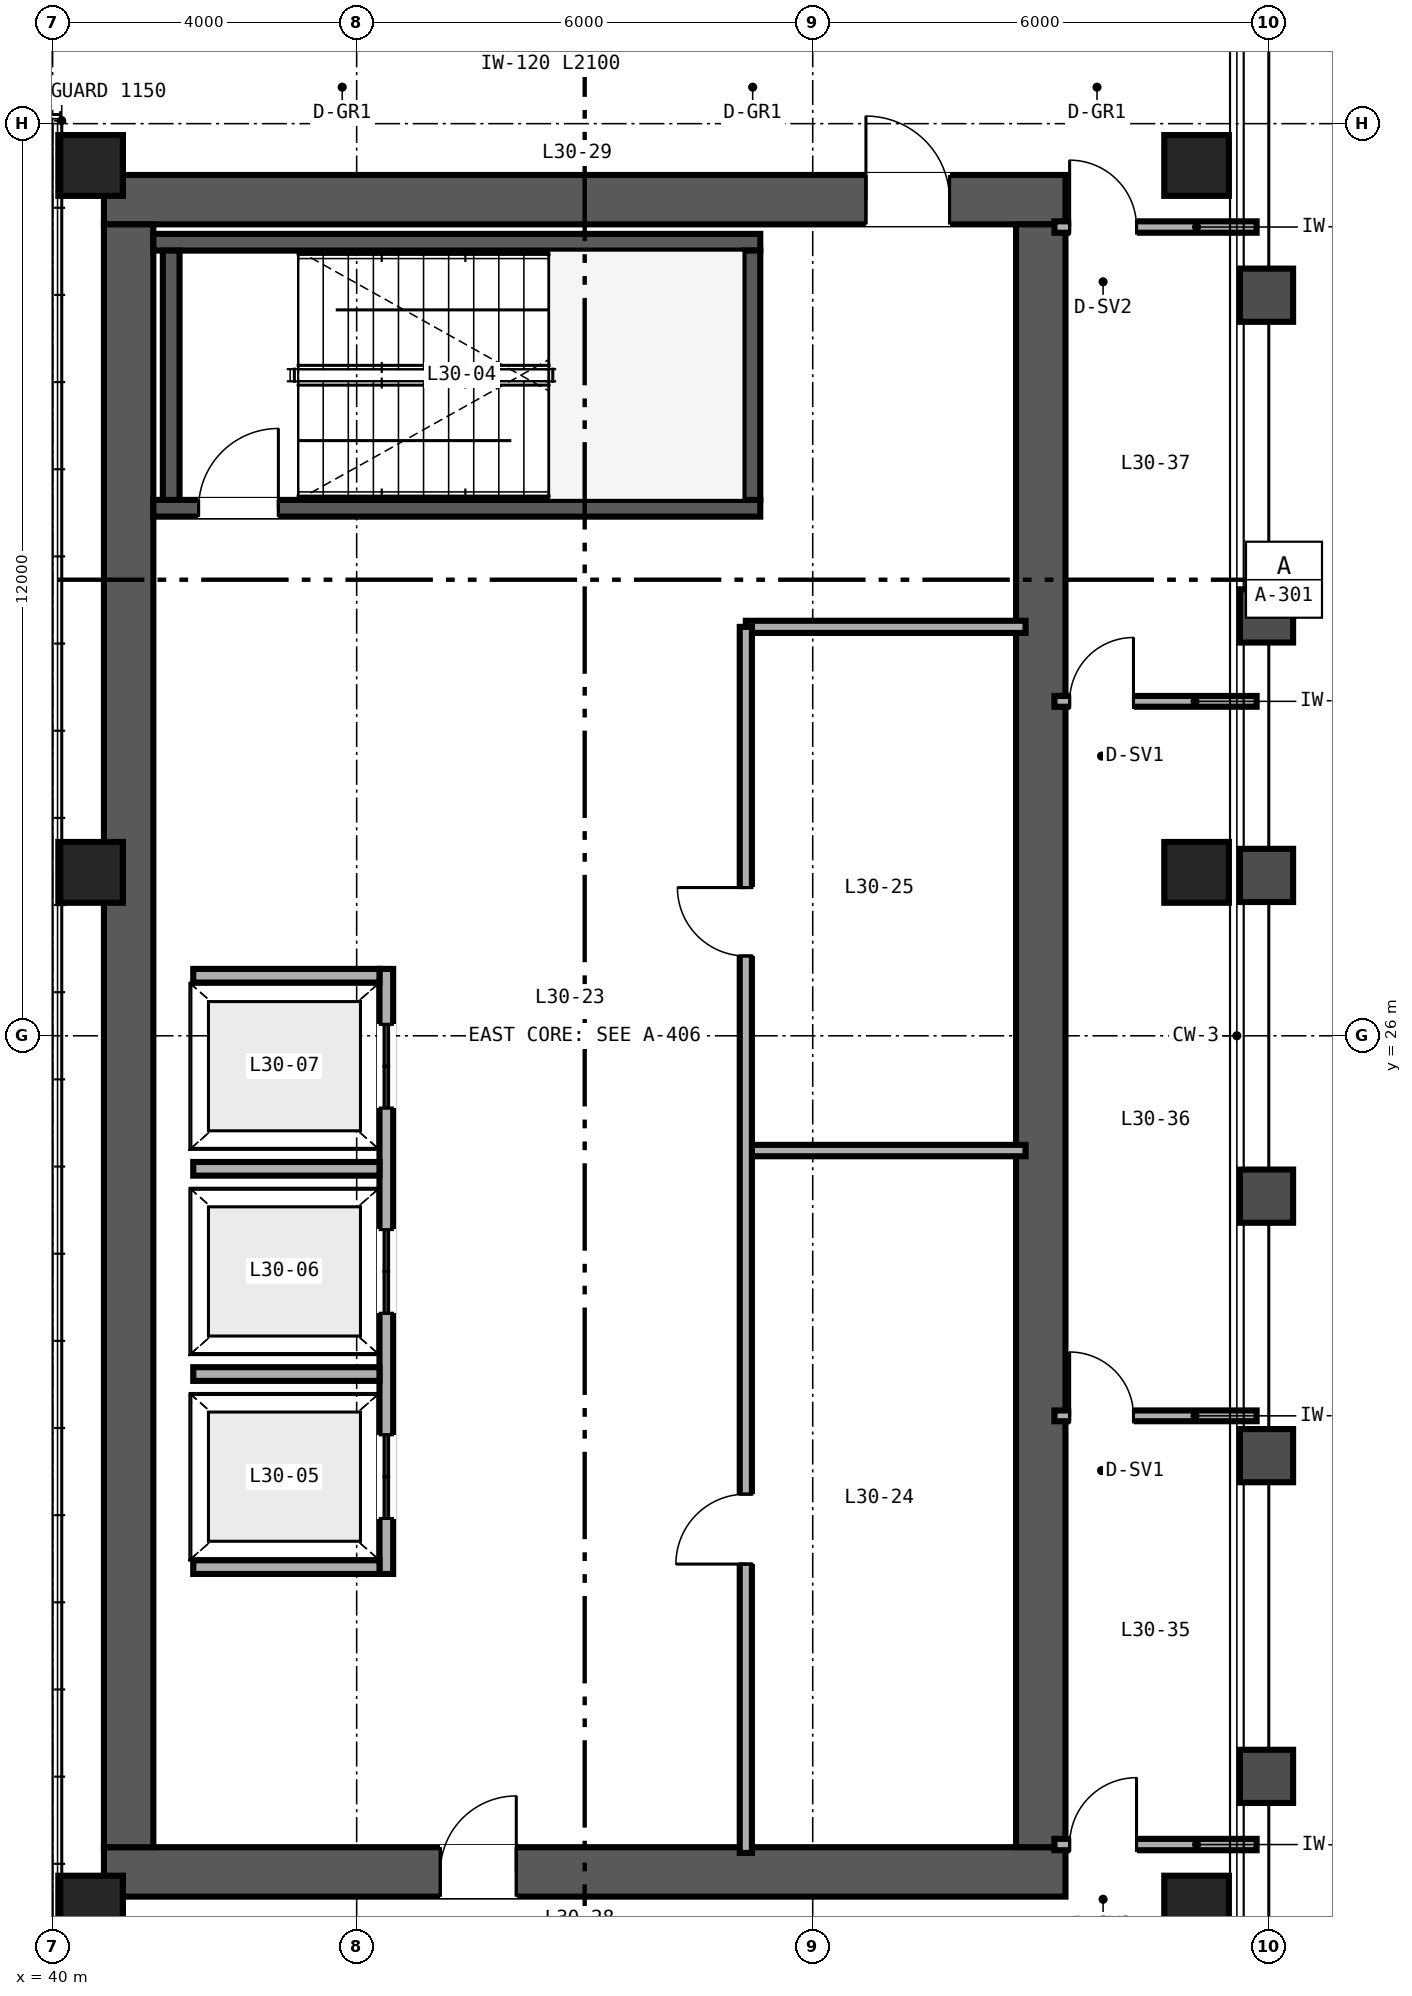
"""IFC4 building model, lengths in metres.
Left out: names, types, materials, properties, quantities, classifications, styles, units other than length and angle.
Written with IfcOpenShell. Run it as: python <this file> out.ifc"""

import sys

from ifc_helpers import new_model, si_unit, direction, frame, frame_2d, origin, origin_2d, place, context, subcontext, project, spatial, rectangle, hollow_rectangle, extrude, source, transform, mapped, element, fill, save


model = new_model("IFC4")
c1 = context("Model", 3, precision=1e-05, world=origin(), true_north=direction((0.0, 1.0)))
c2 = subcontext(c1, "Body", "Model", "MODEL_VIEW")
j1 = project(units=[si_unit("LENGTHUNIT", "METRE"), si_unit("PLANEANGLEUNIT", "RADIAN")], contexts=[c1])
p1 = place(None, origin())
s1 = spatial("IfcSite", under=j1, at=p1, CompositionType="ELEMENT")
p2 = place(p1, origin())
s2 = spatial("IfcBuilding", under=s1, at=p2, CompositionType="ELEMENT")
p3 = place(p2, frame((0.0, 0.0, 122.4)))
s3 = spatial("IfcBuildingStorey", under=s2, at=p3, CompositionType="ELEMENT", Elevation=122.4)
p4 = place(p3, frame((40.675, 15.0, 0.0), z_axis=(0.0, 0.0, 1.0), x_axis=(1.0, 0.0, 0.0)))
e1 = element("IfcWall", 1, at=p4, inside=s3, PredefinedType="SHEAR", context=c2, shape_type="SweptSolid", body=[
    extrude(rectangle(XDim=12.65, YDim=0.65, at=frame_2d((6.325, 0.0))), origin(), (0.0, 0.0, 1.0), 3.36),
])
p5 = place(p4, frame((4.425, 0.0, 0.0)))
e2 = element("IfcOpeningElement", 2, at=p5, cuts=e1, PredefinedType="OPENING", context=c2, shape_type="SweptSolid", body=[
    extrude(rectangle(XDim=1.0, YDim=2.15, at=frame_2d((0.5, 1.075))), frame((0.0, 0.335, 0.0), z_axis=(0.0, -1.0, 0.0), x_axis=(1.0, 0.0, 0.0)), (0.0, 0.0, 1.0), 0.67),
])
p6 = place(p3, frame((40.675, 37.0, 0.0), z_axis=(0.0, 0.0, 1.0), x_axis=(1.0, 0.0, 0.0)))
e3 = element("IfcWall", 3, at=p6, inside=s3, PredefinedType="SHEAR", context=c2, shape_type="SweptSolid", body=[
    extrude(rectangle(XDim=12.65, YDim=0.65, at=frame_2d((6.325, 0.0))), origin(), (0.0, 0.0, 1.0), 3.36),
])
p7 = place(p6, frame((10.025, 0.0, 0.0)))
e4 = element("IfcOpeningElement", 4, at=p7, cuts=e3, PredefinedType="OPENING", context=c2, shape_type="SweptSolid", body=[
    extrude(rectangle(XDim=1.1, YDim=2.15, at=frame_2d((0.55, 1.075))), frame((0.0, 0.335, 0.0), z_axis=(0.0, -1.0, 0.0), x_axis=(1.0, 0.0, 0.0)), (0.0, 0.0, 1.0), 0.67),
])
for number, where, z_axis, x_axis in (
    (5, (41.0, 15.325, 0.0), (0.0, 0.0, 1.0), (0.0, 1.0, 0.0)),
    (6, (53.0, 15.325, 0.0), (0.0, 0.0, 1.0), (0.0, 1.0, 0.0)),
):
    element("IfcWall", number, at=place(p3, frame(where, z_axis=z_axis, x_axis=x_axis)), inside=s3, PredefinedType="SHEAR", context=c2, shape_type="SweptSolid", body=[
        extrude(rectangle(XDim=21.35, YDim=0.65, at=frame_2d((10.675, 0.0))), origin(), (0.0, 0.0, 1.0), 3.36),
    ])
p8 = place(p3, frame((41.325, 32.94, 0.0), z_axis=(0.0, 0.0, 1.0), x_axis=(1.0, 0.0, 0.0)))
e7 = element("IfcWall", 7, at=p8, inside=s3, PredefinedType="SHEAR", context=c2, shape_type="SweptSolid", body=[
    extrude(rectangle(XDim=7.985, YDim=0.22, at=frame_2d((3.993, 0.0))), origin(), (0.0, 0.0, 1.0), 3.4),
])
p9 = place(p8, frame((0.595, 0.0, 0.0)))
e8 = element("IfcOpeningElement", 8, at=p9, cuts=e7, PredefinedType="OPENING", context=c2, shape_type="SweptSolid", body=[
    extrude(rectangle(XDim=1.05, YDim=2.15, at=frame_2d((0.525, 1.075))), frame((0.0, 0.12, 0.0), z_axis=(0.0, -1.0, 0.0), x_axis=(1.0, 0.0, 0.0)), (0.0, 0.0, 1.0), 0.24),
])
p10 = place(p3, frame((41.325, 36.44, 0.0), z_axis=(0.0, 0.0, 1.0), x_axis=(1.0, 0.0, 0.0)))
e9 = element("IfcWall", 9, at=p10, inside=s3, PredefinedType="SHEAR", context=c2, shape_type="SweptSolid", body=[
    extrude(rectangle(XDim=7.985, YDim=0.22, at=frame_2d((3.993, 0.0))), origin(), (0.0, 0.0, 1.0), 3.4),
])
for number, where, z_axis, x_axis in (
    (10, (41.56, 33.05, 0.0), (0.0, 0.0, 1.0), (0.0, 1.0, 0.0)),
    (11, (49.2, 33.05, 0.0), (0.0, 0.0, 1.0), (0.0, 1.0, 0.0)),
):
    element("IfcWall", number, at=place(p3, frame(where, z_axis=z_axis, x_axis=x_axis)), inside=s3, PredefinedType="SHEAR", context=c2, shape_type="SweptSolid", body=[
        extrude(rectangle(XDim=3.28, YDim=0.22, at=frame_2d((1.64, 0.0))), origin(), (0.0, 0.0, 1.0), 3.4),
    ])
m1 = source(origin(), c2, "Body", "SweptSolid", [
    extrude(hollow_rectangle(XDim=0.85, YDim=0.8, WallThickness=0.032, at=origin_2d()), origin(), (0.0, 0.0, 1.0), 3.36),
])
for number, where, z_axis, x_axis in (
    (12, (40.5, 14.55, 0.0), (0.0, 0.0, 1.0), (1.0, 0.0, 0.0)),
    (13, (55.05, 14.55, 0.0), (0.0, 0.0, 1.0), (1.0, 0.0, 0.0)),
    (14, (40.5, 28.15, 0.0), (0.0, 0.0, 1.0), (1.0, 0.0, 0.0)),
    (15, (55.05, 28.15, 0.0), (0.0, 0.0, 1.0), (1.0, 0.0, 0.0)),
    (16, (40.5, 37.45, 0.0), (0.0, 0.0, 1.0), (1.0, 0.0, 0.0)),
    (17, (55.05, 37.45, 0.0), (0.0, 0.0, 1.0), (1.0, 0.0, 0.0)),
):
    element("IfcColumn", number, at=place(p3, frame(where, z_axis=z_axis, x_axis=x_axis)), inside=s3, PredefinedType="COLUMN", context=c2, shape_type="MappedRepresentation", body=[
        mapped(m1, transform((0.0, 0.0, 0.0), scale=1.0)),
    ])
p11 = place(p3, frame((44.39, 18.92, 0.0), z_axis=(0.0, 0.0, 1.0), x_axis=(0.0, 1.0, 0.0)))
e18 = element("IfcWall", 18, at=p11, inside=s3, PredefinedType="SOLIDWALL", context=c2, shape_type="SweptSolid", body=[
    extrude(rectangle(XDim=7.96, YDim=0.18, at=frame_2d((3.98, 0.0))), origin(), (0.0, 0.0, 1.0), 3.36),
])
p12 = place(p11, frame((0.73, 0.0, 0.0)))
e19 = element("IfcOpeningElement", 19, at=p12, cuts=e18, PredefinedType="OPENING", context=c2, shape_type="SweptSolid", body=[
    extrude(rectangle(XDim=1.1, YDim=2.2, at=frame_2d((0.55, 1.1))), frame((0.0, 0.1, 0.0), z_axis=(0.0, -1.0, 0.0), x_axis=(1.0, 0.0, 0.0)), (0.0, 0.0, 1.0), 0.2),
])
p13 = place(p11, frame((3.43, 0.0, 0.0)))
e20 = element("IfcOpeningElement", 20, at=p13, cuts=e18, PredefinedType="OPENING", context=c2, shape_type="SweptSolid", body=[
    extrude(rectangle(XDim=1.1, YDim=2.2, at=frame_2d((0.55, 1.1))), frame((0.0, 0.1, 0.0), z_axis=(0.0, -1.0, 0.0), x_axis=(1.0, 0.0, 0.0)), (0.0, 0.0, 1.0), 0.2),
])
p14 = place(p11, frame((6.13, 0.0, 0.0)))
e21 = element("IfcOpeningElement", 21, at=p14, cuts=e18, PredefinedType="OPENING", context=c2, shape_type="SweptSolid", body=[
    extrude(rectangle(XDim=1.1, YDim=2.2, at=frame_2d((0.55, 1.1))), frame((0.0, 0.1, 0.0), z_axis=(0.0, -1.0, 0.0), x_axis=(1.0, 0.0, 0.0)), (0.0, 0.0, 1.0), 0.2),
])
for number, where, z_axis, x_axis in (
    (22, (41.85, 19.01, 0.0), (0.0, 0.0, 1.0), (1.0, 0.0, 0.0)),
    (23, (41.85, 26.79, 0.0), (0.0, 0.0, 1.0), (1.0, 0.0, 0.0)),
    (24, (41.85, 21.55, 0.0), (0.0, 0.0, 1.0), (1.0, 0.0, 0.0)),
    (25, (41.85, 24.25, 0.0), (0.0, 0.0, 1.0), (1.0, 0.0, 0.0)),
):
    element("IfcWall", number, at=place(p3, frame(where, z_axis=z_axis, x_axis=x_axis)), inside=s3, PredefinedType="SOLIDWALL", context=c2, shape_type="SweptSolid", body=[
        extrude(rectangle(XDim=2.45, YDim=0.18, at=frame_2d((1.225, 0.0))), origin(), (0.0, 0.0, 1.0), 3.36),
    ])
p15 = place(p3, frame((49.12, 31.38, 0.0), z_axis=(0.0, 0.0, 1.0), x_axis=(1.0, 0.0, 0.0)))
e26 = element("IfcWall", 26, at=p15, inside=s3, PredefinedType="PARTITIONING", context=c2, shape_type="SweptSolid", body=[
    extrude(rectangle(XDim=3.68, YDim=0.16, at=frame_2d((1.84, 0.0))), origin(), (0.0, 0.0, 1.0), 2.36),
])
p16 = place(p3, frame((49.12, 24.49, 0.0), z_axis=(0.0, 0.0, 1.0), x_axis=(1.0, 0.0, 0.0)))
e27 = element("IfcWall", 27, at=p16, inside=s3, PredefinedType="PARTITIONING", context=c2, shape_type="SweptSolid", body=[
    extrude(rectangle(XDim=3.68, YDim=0.15, at=frame_2d((1.84, 0.0))), origin(), (0.0, 0.0, 1.0), 3.36),
])
p17 = place(p3, frame((49.12, 15.25, 0.0), z_axis=(0.0, 0.0, 1.0), x_axis=(0.0, 1.0, 0.0)))
e28 = element("IfcWall", 28, at=p17, inside=s3, PredefinedType="PARTITIONING", context=c2, shape_type="SweptSolid", body=[
    extrude(rectangle(XDim=16.13, YDim=0.16, at=frame_2d((8.065, 0.0))), origin(), (0.0, 0.0, 1.0), 2.36),
])
p18 = place(p17, frame((3.8, 0.0, 0.0)))
e29 = element("IfcOpeningElement", 29, at=p18, cuts=e28, PredefinedType="OPENING", context=c2, shape_type="SweptSolid", body=[
    extrude(rectangle(XDim=0.92, YDim=2.15, at=frame_2d((0.46, 1.075))), frame((0.0, 0.09, 0.0), z_axis=(0.0, -1.0, 0.0), x_axis=(1.0, 0.0, 0.0)), (0.0, 0.0, 1.0), 0.18),
])
p19 = place(p17, frame((11.8, 0.0, 0.0)))
e30 = element("IfcOpeningElement", 30, at=p19, cuts=e28, PredefinedType="OPENING", context=c2, shape_type="SweptSolid", body=[
    extrude(rectangle(XDim=0.9, YDim=2.15, at=frame_2d((0.45, 1.075))), frame((0.0, 0.09, 0.0), z_axis=(0.0, -1.0, 0.0), x_axis=(1.0, 0.0, 0.0)), (0.0, 0.0, 1.0), 0.18),
])
p20 = place(p3, frame((53.18, 15.36, 0.0), z_axis=(0.0, 0.0, 1.0), x_axis=(1.0, 0.0, 0.0)))
e31 = element("IfcWall", 31, at=p20, inside=s3, PredefinedType="PARTITIONING", context=c2, shape_type="SweptSolid", body=[
    extrude(rectangle(XDim=2.66, YDim=0.15, at=frame_2d((1.33, 0.0))), origin(), (0.0, 0.0, 1.0), 2.581),
])
p21 = place(p20, frame((0.2, 0.0, 0.0)))
e32 = element("IfcOpeningElement", 32, at=p21, cuts=e31, PredefinedType="OPENING", context=c2, shape_type="SweptSolid", body=[
    extrude(rectangle(XDim=0.88, YDim=2.15, at=frame_2d((0.44, 1.075))), frame((0.0, 0.085, 0.0), z_axis=(0.0, -1.0, 0.0), x_axis=(1.0, 0.0, 0.0)), (0.0, 0.0, 1.0), 0.17),
])
p22 = place(p3, frame((53.18, 36.64, 0.0), z_axis=(0.0, 0.0, 1.0), x_axis=(1.0, 0.0, 0.0)))
e33 = element("IfcWall", 33, at=p22, inside=s3, PredefinedType="PARTITIONING", context=c2, shape_type="SweptSolid", body=[
    extrude(rectangle(XDim=2.66, YDim=0.15, at=frame_2d((1.33, 0.0))), origin(), (0.0, 0.0, 1.0), 2.743),
])
p23 = place(p22, frame((0.2, 0.0, 0.0)))
e34 = element("IfcOpeningElement", 34, at=p23, cuts=e33, PredefinedType="OPENING", context=c2, shape_type="SweptSolid", body=[
    extrude(rectangle(XDim=0.88, YDim=2.15, at=frame_2d((0.44, 1.075))), frame((0.0, 0.085, 0.0), z_axis=(0.0, -1.0, 0.0), x_axis=(1.0, 0.0, 0.0)), (0.0, 0.0, 1.0), 0.17),
])
p24 = place(p3, frame((53.18, 21.0, 0.0), z_axis=(0.0, 0.0, 1.0), x_axis=(1.0, 0.0, 0.0)))
e35 = element("IfcWall", 35, at=p24, inside=s3, PredefinedType="PARTITIONING", context=c2, shape_type="SweptSolid", body=[
    extrude(rectangle(XDim=2.66, YDim=0.142, at=frame_2d((1.33, 0.0))), origin(), (0.0, 0.0, 1.0), 2.581),
])
p25 = place(p24, frame((0.2, 0.0, 0.0)))
e36 = element("IfcOpeningElement", 36, at=p25, cuts=e35, PredefinedType="OPENING", context=c2, shape_type="SweptSolid", body=[
    extrude(rectangle(XDim=0.84, YDim=2.1, at=frame_2d((0.42, 1.05))), frame((0.0, 0.081, 0.0), z_axis=(0.0, -1.0, 0.0), x_axis=(1.0, 0.0, 0.0)), (0.0, 0.0, 1.0), 0.162),
])
p26 = place(p3, frame((53.18, 30.4, 0.0), z_axis=(0.0, 0.0, 1.0), x_axis=(1.0, 0.0, 0.0)))
e37 = element("IfcWall", 37, at=p26, inside=s3, PredefinedType="PARTITIONING", context=c2, shape_type="SweptSolid", body=[
    extrude(rectangle(XDim=2.66, YDim=0.142, at=frame_2d((1.33, 0.0))), origin(), (0.0, 0.0, 1.0), 2.743),
])
p27 = place(p26, frame((0.2, 0.0, 0.0)))
e38 = element("IfcOpeningElement", 38, at=p27, cuts=e37, PredefinedType="OPENING", context=c2, shape_type="SweptSolid", body=[
    extrude(rectangle(XDim=0.84, YDim=2.1, at=frame_2d((0.42, 1.05))), frame((0.0, 0.081, 0.0), z_axis=(0.0, -1.0, 0.0), x_axis=(1.0, 0.0, 0.0)), (0.0, 0.0, 1.0), 0.162),
])
m2 = source(origin(), c2, "Body", "SweptSolid", [
    extrude(rectangle(XDim=1.05, YDim=2.15, at=frame_2d((0.525, 1.075))), frame((0.0, 0.025, 0.0), z_axis=(0.0, -1.0, 0.0), x_axis=(1.0, 0.0, 0.0)), (0.0, 0.0, 1.0), 0.05),
])
p28 = place(p9, origin())
e39 = element("IfcDoor", 39, at=p28, inside=s3, OperationType="SINGLE_SWING_RIGHT", PredefinedType="DOOR", context=c2, shape_type="MappedRepresentation", body=[
    mapped(m2, transform((0.0, 0.0, 0.0), scale=1.0)),
])
fill(e8, e39)
m3 = source(origin(), c2, "Body", "SweptSolid", [
    extrude(rectangle(XDim=1.1, YDim=2.2, at=frame_2d((0.55, 1.1))), frame((0.0, 0.025, 0.0), z_axis=(0.0, -1.0, 0.0), x_axis=(1.0, 0.0, 0.0)), (0.0, 0.0, 1.0), 0.05),
])
p29 = place(p12, origin())
e40 = element("IfcDoor", 40, at=p29, inside=s3, OperationType="DOUBLE_DOOR_SLIDING", PredefinedType="DOOR", context=c2, shape_type="MappedRepresentation", body=[
    mapped(m3, transform((0.0, 0.0, 0.0), scale=1.0)),
])
fill(e19, e40)
p30 = place(p13, origin())
e41 = element("IfcDoor", 41, at=p30, inside=s3, OperationType="DOUBLE_DOOR_SLIDING", PredefinedType="DOOR", context=c2, shape_type="MappedRepresentation", body=[
    mapped(m3, transform((0.0, 0.0, 0.0), scale=1.0)),
])
fill(e20, e41)
p31 = place(p14, origin())
e42 = element("IfcDoor", 42, at=p31, inside=s3, OperationType="DOUBLE_DOOR_SLIDING", PredefinedType="DOOR", context=c2, shape_type="MappedRepresentation", body=[
    mapped(m3, transform((0.0, 0.0, 0.0), scale=1.0)),
])
fill(e21, e42)
m4 = source(origin(), c2, "Body", "SweptSolid", [
    extrude(rectangle(XDim=1.0, YDim=2.15, at=frame_2d((0.5, 1.075))), frame((0.0, 0.025, 0.0), z_axis=(0.0, -1.0, 0.0), x_axis=(1.0, 0.0, 0.0)), (0.0, 0.0, 1.0), 0.05),
])
p32 = place(p5, origin())
e43 = element("IfcDoor", 43, at=p32, inside=s3, OperationType="SINGLE_SWING_RIGHT", PredefinedType="DOOR", context=c2, shape_type="MappedRepresentation", body=[
    mapped(m4, transform((0.0, 0.0, 0.0), scale=1.0)),
])
fill(e2, e43)
m5 = source(origin(), c2, "Body", "SweptSolid", [
    extrude(rectangle(XDim=1.1, YDim=2.15, at=frame_2d((0.55, 1.075))), frame((0.0, 0.025, 0.0), z_axis=(0.0, -1.0, 0.0), x_axis=(1.0, 0.0, 0.0)), (0.0, 0.0, 1.0), 0.05),
])
p33 = place(p7, origin())
e44 = element("IfcDoor", 44, at=p33, inside=s3, OperationType="SINGLE_SWING_LEFT", PredefinedType="DOOR", context=c2, shape_type="MappedRepresentation", body=[
    mapped(m5, transform((0.0, 0.0, 0.0), scale=1.0)),
])
fill(e4, e44)
m6 = source(origin(), c2, "Body", "SweptSolid", [
    extrude(rectangle(XDim=0.92, YDim=2.15, at=frame_2d((0.46, 1.075))), frame((0.0, 0.025, 0.0), z_axis=(0.0, -1.0, 0.0), x_axis=(1.0, 0.0, 0.0)), (0.0, 0.0, 1.0), 0.05),
])
p34 = place(p18, origin())
e45 = element("IfcDoor", 45, at=p34, inside=s3, OperationType="SINGLE_SWING_LEFT", PredefinedType="DOOR", context=c2, shape_type="MappedRepresentation", body=[
    mapped(m6, transform((0.0, 0.0, 0.0), scale=1.0)),
])
fill(e29, e45)
m7 = source(origin(), c2, "Body", "SweptSolid", [
    extrude(rectangle(XDim=0.9, YDim=2.15, at=frame_2d((0.45, 1.075))), frame((0.0, 0.025, 0.0), z_axis=(0.0, -1.0, 0.0), x_axis=(1.0, 0.0, 0.0)), (0.0, 0.0, 1.0), 0.05),
])
p35 = place(p19, origin())
e46 = element("IfcDoor", 46, at=p35, inside=s3, OperationType="SINGLE_SWING_RIGHT", PredefinedType="DOOR", context=c2, shape_type="MappedRepresentation", body=[
    mapped(m7, transform((0.0, 0.0, 0.0), scale=1.0)),
])
fill(e30, e46)
m8 = source(origin(), c2, "Body", "SweptSolid", [
    extrude(rectangle(XDim=0.88, YDim=2.15, at=frame_2d((0.44, 1.075))), frame((0.0, 0.025, 0.0), z_axis=(0.0, -1.0, 0.0), x_axis=(1.0, 0.0, 0.0)), (0.0, 0.0, 1.0), 0.05),
])
p36 = place(p21, origin())
e47 = element("IfcDoor", 47, at=p36, inside=s3, OperationType="SINGLE_SWING_RIGHT", PredefinedType="DOOR", context=c2, shape_type="MappedRepresentation", body=[
    mapped(m8, transform((0.0, 0.0, 0.0), scale=1.0)),
])
fill(e32, e47)
p37 = place(p23, origin())
e48 = element("IfcDoor", 48, at=p37, inside=s3, OperationType="SINGLE_SWING_LEFT", PredefinedType="DOOR", context=c2, shape_type="MappedRepresentation", body=[
    mapped(m8, transform((0.0, 0.0, 0.0), scale=1.0)),
])
fill(e34, e48)
m9 = source(origin(), c2, "Body", "SweptSolid", [
    extrude(rectangle(XDim=0.84, YDim=2.1, at=frame_2d((0.42, 1.05))), frame((0.0, 0.025, 0.0), z_axis=(0.0, -1.0, 0.0), x_axis=(1.0, 0.0, 0.0)), (0.0, 0.0, 1.0), 0.05),
])
p38 = place(p25, origin())
e49 = element("IfcDoor", 49, at=p38, inside=s3, OperationType="SINGLE_SWING_LEFT", PredefinedType="DOOR", context=c2, shape_type="MappedRepresentation", body=[
    mapped(m9, transform((0.0, 0.0, 0.0), scale=1.0)),
])
fill(e36, e49)
p39 = place(p27, origin())
e50 = element("IfcDoor", 50, at=p39, inside=s3, OperationType="SINGLE_SWING_RIGHT", PredefinedType="DOOR", context=c2, shape_type="MappedRepresentation", body=[
    mapped(m9, transform((0.0, 0.0, 0.0), scale=1.0)),
])
fill(e38, e50)
save(model, sys.argv[1])
